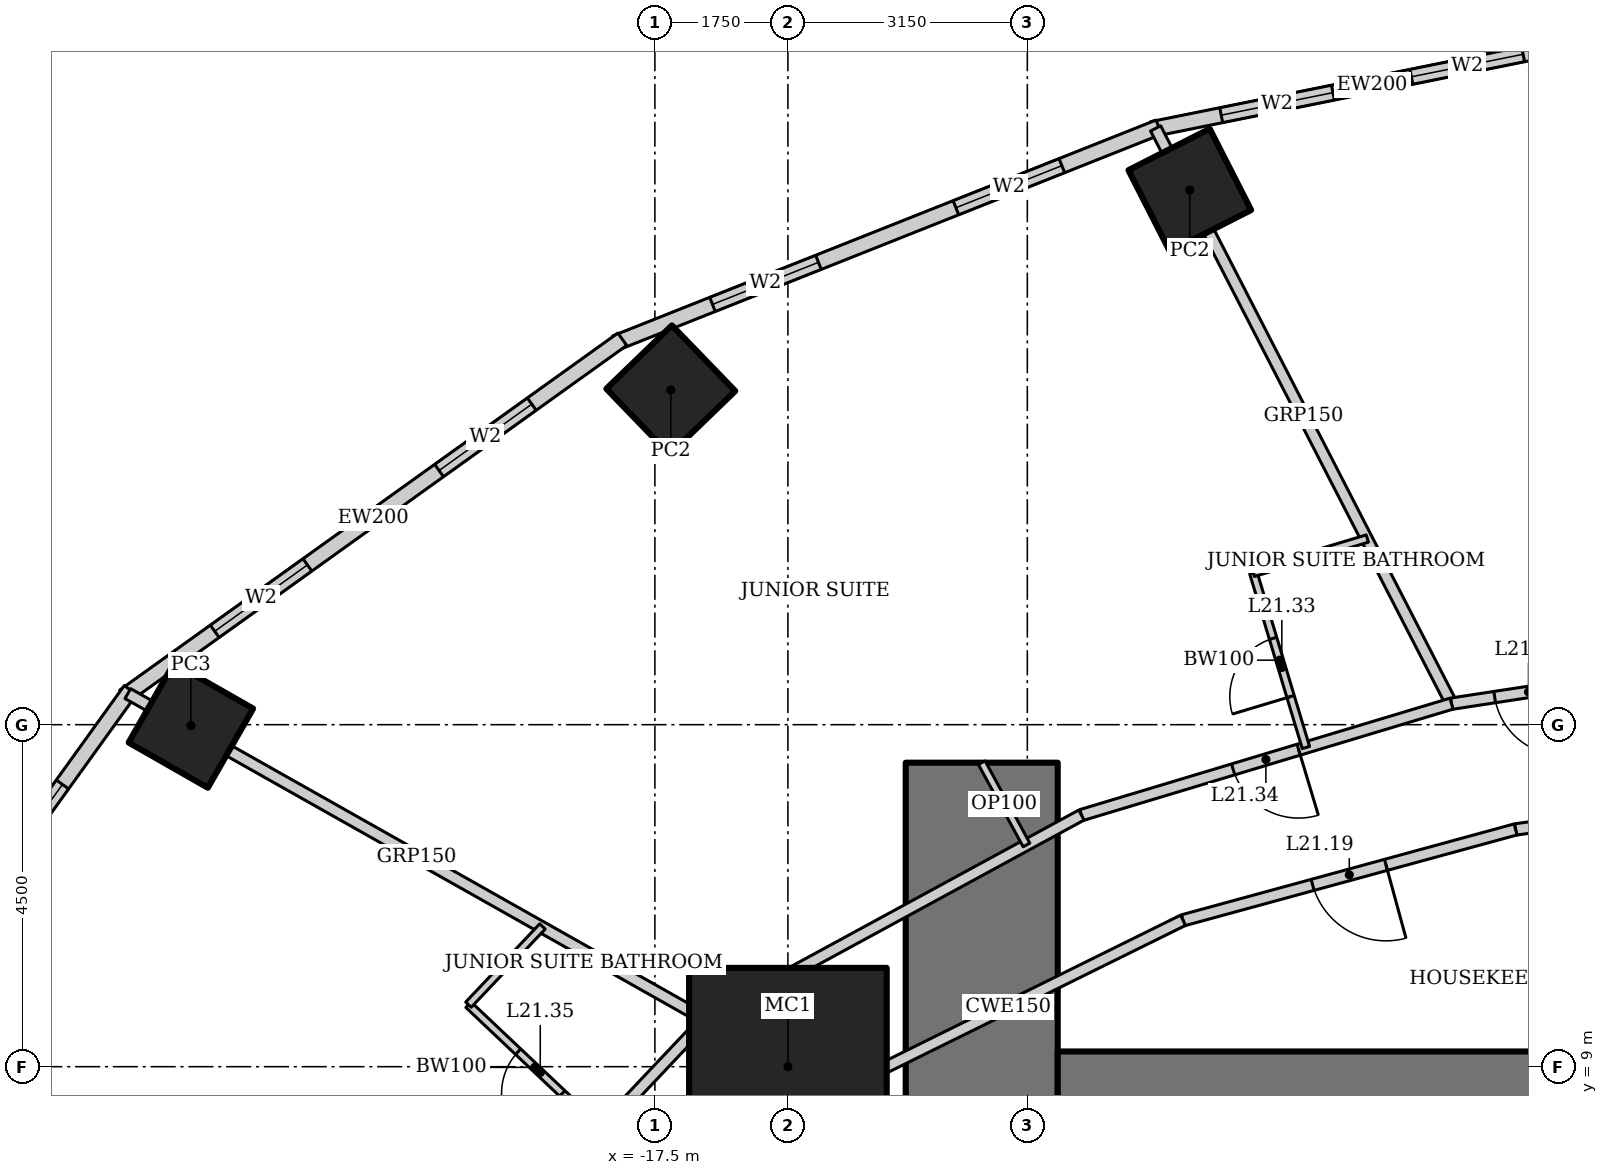
"""IFC4 building model, lengths in metres.
Left out: names, types, materials, properties, quantities, classifications, styles, units other than length and angle.
Written with IfcOpenShell. Run it as: python <this file> out.ifc"""

import sys

from ifc_helpers import new_model, si_unit, direction, frame, frame_2d, origin, origin_2d, place, context, subcontext, project, spatial, rectangle, hollow_rectangle, extrude, element, fill, save


model = new_model("IFC4")
c1 = context("Model", 3, precision=1e-05, world=origin(), true_north=direction((0.0, 1.0)))
c2 = subcontext(c1, "Body", "Model", "MODEL_VIEW")
j1 = project(units=[si_unit("LENGTHUNIT", "METRE"), si_unit("PLANEANGLEUNIT", "RADIAN")], contexts=[c1])
p1 = place(None, origin())
s1 = spatial("IfcSite", under=j1, at=p1, CompositionType="ELEMENT")
p2 = place(p1, origin())
s2 = spatial("IfcBuilding", under=s1, at=p2, CompositionType="ELEMENT")
p3 = place(p2, frame((0.0, 0.0, 91.0)))
s3 = spatial("IfcBuildingStorey", under=s2, at=p3, CompositionType="ELEMENT", Elevation=91.0)
p4 = place(p3, frame((-15.75, 9.0, 0.0), z_axis=(0.0, 0.0, 1.0), x_axis=(1.0, 0.0, 0.0)))
e1 = element("IfcColumn", 1, at=p4, inside=s3, PredefinedType="COLUMN", context=c2, shape_type="SweptSolid", body=[
    extrude(hollow_rectangle(XDim=2.6, YDim=2.6, WallThickness=0.13, at=origin_2d()), origin(), (0.0, 0.0, 1.0), 3.6),
])
for number, where, z_axis, x_axis in (
    (2, (-10.463, 20.534, 0.0), (0.0, 0.0, 1.0), (0.891, 0.454, 0.0)),
    (3, (-17.291, 17.905, 0.0), (0.0, 0.0, 1.0), (0.719, 0.695, 0.0)),
):
    element("IfcColumn", number, at=place(p3, frame(where, z_axis=z_axis, x_axis=x_axis)), inside=s3, PredefinedType="COLUMN", context=c2, shape_type="SweptSolid", body=[
        extrude(hollow_rectangle(XDim=1.2, YDim=1.2, WallThickness=0.1, at=origin_2d()), origin(), (0.0, 0.0, 1.0), 3.6),
    ])
p5 = place(p3, frame((-23.605, 13.489, 0.0), z_axis=(0.0, 0.0, 1.0), x_axis=(0.496139221777, 0.86824298017, 0.0)))
e4 = element("IfcColumn", 4, at=p5, inside=s3, PredefinedType="COLUMN", context=c2, shape_type="SweptSolid", body=[
    extrude(hollow_rectangle(XDim=1.2, YDim=1.2, WallThickness=0.12, at=origin_2d()), origin(), (0.0, 0.0, 1.0), 3.6),
])
p6 = place(p3, frame((-13.2, 13.0, 0.0), z_axis=(0.0, 0.0, 1.0), x_axis=(0.0, -1.0, 0.0)))
e5 = element("IfcWall", 5, at=p6, inside=s3, PredefinedType="SHEAR", context=c2, shape_type="SweptSolid", body=[
    extrude(rectangle(XDim=26.0, YDim=2.0, at=frame_2d((13.0, 0.0))), origin(), (0.0, 0.0, 1.0), 3.6),
])
p7 = place(p6, frame((12.1, 0.0, 0.0)))
e6 = element("IfcOpeningElement", 6, at=p7, cuts=e5, PredefinedType="OPENING", context=c2, shape_type="SweptSolid", body=[
    extrude(rectangle(XDim=1.8, YDim=2.1, at=frame_2d((0.9, 1.05))), frame((0.0, 1.01, 0.0), z_axis=(0.0, -1.0, 0.0), x_axis=(1.0, 0.0, 0.0)), (0.0, 0.0, 1.0), 2.02),
])
p8 = place(p3, frame((12.2, 8.0, 0.0), z_axis=(0.0, 0.0, 1.0), x_axis=(-1.0, 0.0, 0.0)))
e7 = element("IfcWall", 7, at=p8, inside=s3, PredefinedType="SHEAR", context=c2, shape_type="SweptSolid", body=[
    extrude(rectangle(XDim=24.4, YDim=2.4, at=frame_2d((12.2, 0.0))), origin(), (0.0, 0.0, 1.0), 3.6),
])
p9 = place(p3, frame((-5.17, 22.504, 0.0), z_axis=(0.0, 0.0, 1.0), x_axis=(-0.980251657452, -0.197754110105, 0.0)))
e8 = element("IfcWall", 8, at=p9, inside=s3, PredefinedType="SOLIDWALL", context=c2, shape_type="SweptSolid", body=[
    extrude(rectangle(XDim=5.904, YDim=0.2, at=frame_2d((2.952, 0.0))), origin(), (0.0, 0.0, 1.0), 3.45),
])
p10 = place(p9, frame((0.926, 0.0, 0.5)))
e9 = element("IfcOpeningElement", 9, at=p10, cuts=e8, PredefinedType="OPENING", context=c2, shape_type="SweptSolid", body=[
    extrude(rectangle(XDim=1.5, YDim=2.2, at=frame_2d((0.75, 1.1))), frame((0.0, 0.11, 0.0), z_axis=(0.0, -1.0, 0.0), x_axis=(1.0, 0.0, 0.0)), (0.0, 0.0, 1.0), 0.22),
])
p11 = place(p9, frame((3.478, 0.0, 0.5)))
e10 = element("IfcOpeningElement", 10, at=p11, cuts=e8, PredefinedType="OPENING", context=c2, shape_type="SweptSolid", body=[
    extrude(rectangle(XDim=1.5, YDim=2.2, at=frame_2d((0.75, 1.1))), frame((0.0, 0.11, 0.0), z_axis=(0.0, -1.0, 0.0), x_axis=(1.0, 0.0, 0.0)), (0.0, 0.0, 1.0), 0.22),
])
p12 = place(p3, frame((-10.869, 21.363, 0.0), z_axis=(0.0, 0.0, 1.0), x_axis=(-0.929358351251, -0.369178892895, 0.0)))
e11 = element("IfcWall", 11, at=p12, inside=s3, PredefinedType="SOLIDWALL", context=c2, shape_type="SweptSolid", body=[
    extrude(rectangle(XDim=7.692, YDim=0.2, at=frame_2d((3.846, 0.0))), origin(), (0.0, 0.0, 1.0), 3.45),
])
p13 = place(p12, frame((1.373, 0.0, 0.5)))
e12 = element("IfcOpeningElement", 12, at=p13, cuts=e11, PredefinedType="OPENING", context=c2, shape_type="SweptSolid", body=[
    extrude(rectangle(XDim=1.5, YDim=2.2, at=frame_2d((0.75, 1.1))), frame((0.0, 0.11, 0.0), z_axis=(0.0, -1.0, 0.0), x_axis=(1.0, 0.0, 0.0)), (0.0, 0.0, 1.0), 0.22),
])
p14 = place(p12, frame((4.819, 0.0, 0.5)))
e13 = element("IfcOpeningElement", 13, at=p14, cuts=e11, PredefinedType="OPENING", context=c2, shape_type="SweptSolid", body=[
    extrude(rectangle(XDim=1.5, YDim=2.2, at=frame_2d((0.75, 1.1))), frame((0.0, 0.11, 0.0), z_axis=(0.0, -1.0, 0.0), x_axis=(1.0, 0.0, 0.0)), (0.0, 0.0, 1.0), 0.22),
])
p15 = place(p3, frame((-17.929, 18.572, 0.0), z_axis=(0.0, 0.0, 1.0), x_axis=(-0.812791321576, -0.582554948112, 0.0)))
e14 = element("IfcWall", 14, at=p15, inside=s3, PredefinedType="SOLIDWALL", context=c2, shape_type="SweptSolid", body=[
    extrude(rectangle(XDim=8.063, YDim=0.2, at=frame_2d((4.032, 0.0))), origin(), (0.0, 0.0, 1.0), 3.45),
])
p16 = place(p15, frame((1.466, 0.0, 0.5)))
e15 = element("IfcOpeningElement", 15, at=p16, cuts=e14, PredefinedType="OPENING", context=c2, shape_type="SweptSolid", body=[
    extrude(rectangle(XDim=1.5, YDim=2.2, at=frame_2d((0.75, 1.1))), frame((0.0, 0.11, 0.0), z_axis=(0.0, -1.0, 0.0), x_axis=(1.0, 0.0, 0.0)), (0.0, 0.0, 1.0), 0.22),
])
p17 = place(p15, frame((5.097, 0.0, 0.5)))
e16 = element("IfcOpeningElement", 16, at=p17, cuts=e14, PredefinedType="OPENING", context=c2, shape_type="SweptSolid", body=[
    extrude(rectangle(XDim=1.5, YDim=2.2, at=frame_2d((0.75, 1.1))), frame((0.0, 0.11, 0.0), z_axis=(0.0, -1.0, 0.0), x_axis=(1.0, 0.0, 0.0)), (0.0, 0.0, 1.0), 0.22),
])
p18 = place(p3, frame((-24.4, 13.957, 0.0), z_axis=(0.0, 0.0, 1.0), x_axis=(-0.583937613703, -0.811798536155, 0.0)))
e17 = element("IfcWall", 17, at=p18, inside=s3, PredefinedType="SOLIDWALL", context=c2, shape_type="SweptSolid", body=[
    extrude(rectangle(XDim=8.323, YDim=0.2, at=frame_2d((4.162, 0.0))), origin(), (0.0, 0.0, 1.0), 3.45),
])
p19 = place(p18, frame((1.531, 0.0, 0.5)))
e18 = element("IfcOpeningElement", 18, at=p19, cuts=e17, PredefinedType="OPENING", context=c2, shape_type="SweptSolid", body=[
    extrude(rectangle(XDim=1.5, YDim=2.2, at=frame_2d((0.75, 1.1))), frame((0.0, 0.11, 0.0), z_axis=(0.0, -1.0, 0.0), x_axis=(1.0, 0.0, 0.0)), (0.0, 0.0, 1.0), 0.22),
])
p20 = place(p18, frame((5.292, 0.0, 0.5)))
e19 = element("IfcOpeningElement", 19, at=p20, cuts=e17, PredefinedType="OPENING", context=c2, shape_type="SweptSolid", body=[
    extrude(rectangle(XDim=1.5, YDim=2.2, at=frame_2d((0.75, 1.1))), frame((0.0, 0.11, 0.0), z_axis=(0.0, -1.0, 0.0), x_axis=(1.0, 0.0, 0.0)), (0.0, 0.0, 1.0), 0.22),
])
p21 = place(p3, frame((-10.912, 21.346, 0.0), z_axis=(0.0, 0.0, 1.0), x_axis=(0.457327273085, -0.889298468059, 0.0)))
e20 = element("IfcWall", 20, at=p21, inside=s3, PredefinedType="PARTITIONING", context=c2, shape_type="SweptSolid", body=[
    extrude(rectangle(XDim=8.511, YDim=0.15, at=frame_2d((4.256, 0.0))), origin(), (0.0, 0.0, 1.0), 2.528),
])
p22 = place(p3, frame((-24.435, 13.909, 0.0), z_axis=(0.0, 0.0, 1.0), x_axis=(0.87090601027, -0.491449612143, 0.0)))
e21 = element("IfcWall", 21, at=p22, inside=s3, PredefinedType="PARTITIONING", context=c2, shape_type="SweptSolid", body=[
    extrude(rectangle(XDim=8.726, YDim=0.15, at=frame_2d((4.363, 0.0))), origin(), (0.0, 0.0, 1.0), 2.693),
])
p23 = place(p3, frame((-3.311, 14.342, 0.0), z_axis=(0.0, 0.0, 1.0), x_axis=(-0.988564270062, -0.150800145746, 0.0)))
e22 = element("IfcWall", 22, at=p23, inside=s3, PredefinedType="PARTITIONING", context=c2, shape_type="SweptSolid", body=[
    extrude(rectangle(XDim=3.751, YDim=0.15, at=frame_2d((1.875, 0.0))), origin(), (0.0, 0.0, 1.0), 3.45),
])
p24 = place(p23, frame((2.276, 0.0, 0.0)))
e23 = element("IfcOpeningElement", 23, at=p24, cuts=e22, PredefinedType="OPENING", context=c2, shape_type="SweptSolid", body=[
    extrude(rectangle(XDim=0.9, YDim=2.1, at=frame_2d((0.45, 1.05))), frame((0.0, 0.085, 0.0), z_axis=(0.0, -1.0, 0.0), x_axis=(1.0, 0.0, 0.0)), (0.0, 0.0, 1.0), 0.17),
])
p25 = place(p3, frame((-7.019, 13.776, 0.0), z_axis=(0.0, 0.0, 1.0), x_axis=(-0.957564241242, -0.288219922793, 0.0)))
e24 = element("IfcWall", 24, at=p25, inside=s3, PredefinedType="PARTITIONING", context=c2, shape_type="SweptSolid", body=[
    extrude(rectangle(XDim=5.085, YDim=0.15, at=frame_2d((2.542, 0.0))), origin(), (0.0, 0.0, 1.0), 3.45),
])
p26 = place(p25, frame((2.1, 0.0, 0.0)))
e25 = element("IfcOpeningElement", 25, at=p26, cuts=e24, PredefinedType="OPENING", context=c2, shape_type="SweptSolid", body=[
    extrude(rectangle(XDim=0.9, YDim=2.1, at=frame_2d((0.45, 1.05))), frame((0.0, 0.085, 0.0), z_axis=(0.0, -1.0, 0.0), x_axis=(1.0, 0.0, 0.0)), (0.0, 0.0, 1.0), 0.17),
])
p27 = place(p3, frame((-11.888, 12.311, 0.0), z_axis=(0.0, 0.0, 1.0), x_axis=(-0.878450059298, -0.477834169267, 0.0)))
e26 = element("IfcWall", 26, at=p27, inside=s3, PredefinedType="PARTITIONING", context=c2, shape_type="SweptSolid", body=[
    extrude(rectangle(XDim=5.631, YDim=0.15, at=frame_2d((2.815, 0.0))), origin(), (0.0, 0.0, 1.0), 3.45),
])
p28 = place(p3, frame((-16.835, 9.62, 0.0), z_axis=(0.0, 0.0, 1.0), x_axis=(-0.687062608696, -0.726598218916, 0.0)))
e27 = element("IfcWall", 27, at=p28, inside=s3, PredefinedType="PARTITIONING", context=c2, shape_type="SweptSolid", body=[
    extrude(rectangle(XDim=6.039, YDim=0.15, at=frame_2d((3.02, 0.0))), origin(), (0.0, 0.0, 1.0), 3.45),
])
p29 = place(p3, frame((-2.903, 12.574, 0.0), z_axis=(0.0, 0.0, 1.0), x_axis=(-0.990563451353, -0.137054911782, 0.0)))
e28 = element("IfcWall", 28, at=p29, inside=s3, PredefinedType="PARTITIONING", context=c2, shape_type="SweptSolid", body=[
    extrude(rectangle(XDim=3.304, YDim=0.15, at=frame_2d((1.652, 0.0))), origin(), (0.0, 0.0, 1.0), 3.45),
])
p30 = place(p29, frame((0.1, 0.0, 0.0)))
e29 = element("IfcOpeningElement", 29, at=p30, cuts=e28, PredefinedType="OPENING", context=c2, shape_type="SweptSolid", body=[
    extrude(rectangle(XDim=0.9, YDim=2.1, at=frame_2d((0.45, 1.05))), frame((0.0, 0.085, 0.0), z_axis=(0.0, -1.0, 0.0), x_axis=(1.0, 0.0, 0.0)), (0.0, 0.0, 1.0), 0.17),
])
p31 = place(p3, frame((-6.176, 12.122, 0.0), z_axis=(0.0, 0.0, 1.0), x_axis=(-0.964644466646, -0.263554648923, 0.0)))
e30 = element("IfcWall", 30, at=p31, inside=s3, PredefinedType="PARTITIONING", context=c2, shape_type="SweptSolid", body=[
    extrude(rectangle(XDim=4.535, YDim=0.15, at=frame_2d((2.268, 0.0))), origin(), (0.0, 0.0, 1.0), 3.45),
])
p32 = place(p31, frame((1.768, 0.0, 0.0)))
e31 = element("IfcOpeningElement", 31, at=p32, cuts=e30, PredefinedType="OPENING", context=c2, shape_type="SweptSolid", body=[
    extrude(rectangle(XDim=1.0, YDim=2.1, at=frame_2d((0.5, 1.05))), frame((0.0, 0.085, 0.0), z_axis=(0.0, -1.0, 0.0), x_axis=(1.0, 0.0, 0.0)), (0.0, 0.0, 1.0), 0.17),
])
p33 = place(p3, frame((-10.551, 10.926, 0.0), z_axis=(0.0, 0.0, 1.0), x_axis=(-0.89656943448, -0.442903205177, 0.0)))
e32 = element("IfcWall", 32, at=p33, inside=s3, PredefinedType="PARTITIONING", context=c2, shape_type="SweptSolid", body=[
    extrude(rectangle(XDim=5.126, YDim=0.15, at=frame_2d((2.563, 0.0))), origin(), (0.0, 0.0, 1.0), 3.45),
])
p34 = place(p3, frame((-15.147, 8.656, 0.0), z_axis=(0.0, 0.0, 1.0), x_axis=(-0.720837261072, -0.693104352209, 0.0)))
e33 = element("IfcWall", 33, at=p34, inside=s3, PredefinedType="PARTITIONING", context=c2, shape_type="SweptSolid", body=[
    extrude(rectangle(XDim=5.59, YDim=0.15, at=frame_2d((2.795, 0.0))), origin(), (0.0, 0.0, 1.0), 3.45),
])
p35 = place(p34, frame((2.295, 0.0, 0.0)))
e34 = element("IfcOpeningElement", 34, at=p35, cuts=e33, PredefinedType="OPENING", context=c2, shape_type="SweptSolid", body=[
    extrude(rectangle(XDim=1.0, YDim=2.1, at=frame_2d((0.5, 1.05))), frame((0.0, 0.085, 0.0), z_axis=(0.0, -1.0, 0.0), x_axis=(1.0, 0.0, 0.0)), (0.0, 0.0, 1.0), 0.17),
])
p36 = place(p3, frame((-8.935, 13.2, 0.0), z_axis=(0.0, 0.0, 1.0), x_axis=(-0.288197066254, 0.957571120598, 0.0)))
e35 = element("IfcWall", 35, at=p36, inside=s3, PredefinedType="PARTITIONING", context=c2, shape_type="SweptSolid", body=[
    extrude(rectangle(XDim=2.4, YDim=0.1, at=frame_2d((1.2, 0.0))), origin(), (0.0, 0.0, 1.0), 3.45),
])
p37 = place(p36, frame((0.7, 0.0, 0.0)))
e36 = element("IfcOpeningElement", 36, at=p37, cuts=e35, PredefinedType="OPENING", context=c2, shape_type="SweptSolid", body=[
    extrude(rectangle(XDim=0.8, YDim=2.1, at=frame_2d((0.4, 1.05))), frame((0.0, 0.06, 0.0), z_axis=(0.0, -1.0, 0.0), x_axis=(1.0, 0.0, 0.0)), (0.0, 0.0, 1.0), 0.12),
])
p38 = place(p3, frame((-9.626, 15.498, 0.0), z_axis=(0.0, 0.0, 1.0), x_axis=(0.957551231109, 0.288263143328, 0.0)))
e37 = element("IfcWall", 37, at=p38, inside=s3, PredefinedType="PARTITIONING", context=c2, shape_type="SweptSolid", body=[
    extrude(rectangle(XDim=1.566, YDim=0.1, at=frame_2d((0.783, 0.0))), origin(), (0.0, 0.0, 1.0), 3.45),
])
p39 = place(p3, frame((-18.209, 8.167, 0.0), z_axis=(0.0, 0.0, 1.0), x_axis=(-0.726567238928, 0.687095369885, 0.0)))
e38 = element("IfcWall", 38, at=p39, inside=s3, PredefinedType="PARTITIONING", context=c2, shape_type="SweptSolid", body=[
    extrude(rectangle(XDim=2.4, YDim=0.1, at=frame_2d((1.2, 0.0))), origin(), (0.0, 0.0, 1.0), 3.45),
])
p40 = place(p39, frame((0.7, 0.0, 0.0)))
e39 = element("IfcOpeningElement", 39, at=p40, cuts=e38, PredefinedType="OPENING", context=c2, shape_type="SweptSolid", body=[
    extrude(rectangle(XDim=0.8, YDim=2.1, at=frame_2d((0.4, 1.05))), frame((0.0, 0.06, 0.0), z_axis=(0.0, -1.0, 0.0), x_axis=(1.0, 0.0, 0.0)), (0.0, 0.0, 1.0), 0.12),
])
p41 = place(p3, frame((-19.953, 9.816, 0.0), z_axis=(0.0, 0.0, 1.0), x_axis=(0.687017997787, 0.726640399866, 0.0)))
e40 = element("IfcWall", 40, at=p41, inside=s3, PredefinedType="PARTITIONING", context=c2, shape_type="SweptSolid", body=[
    extrude(rectangle(XDim=1.417, YDim=0.1, at=frame_2d((0.708, 0.0))), origin(), (0.0, 0.0, 1.0), 3.45),
])
p42 = place(p3, frame((-13.2, 13.0, 0.0), z_axis=(0.0, 0.0, 1.0), x_axis=(0.477852414256, -0.878440134665, 0.0)))
e41 = element("IfcWall", 41, at=p42, inside=s3, PredefinedType="PARTITIONING", context=c2, shape_type="SweptSolid", body=[
    extrude(rectangle(XDim=1.232, YDim=0.1, at=frame_2d((0.616, 0.0))), origin(), (0.0, 0.0, 1.0), 3.45),
])
p43 = place(p10, origin())
e42 = element("IfcWindow", 42, at=p43, inside=s3, PartitioningType="SINGLE_PANEL", PredefinedType="WINDOW", context=c2, shape_type="SweptSolid", body=[
    extrude(rectangle(XDim=1.5, YDim=2.2, at=frame_2d((0.75, 1.1))), frame((0.0, 0.03, 0.0), z_axis=(0.0, -1.0, 0.0), x_axis=(1.0, 0.0, 0.0)), (0.0, 0.0, 1.0), 0.06),
])
fill(e9, e42)
p44 = place(p11, origin())
e43 = element("IfcWindow", 43, at=p44, inside=s3, PartitioningType="SINGLE_PANEL", PredefinedType="WINDOW", context=c2, shape_type="SweptSolid", body=[
    extrude(rectangle(XDim=1.5, YDim=2.2, at=frame_2d((0.75, 1.1))), frame((0.0, 0.03, 0.0), z_axis=(0.0, -1.0, 0.0), x_axis=(1.0, 0.0, 0.0)), (0.0, 0.0, 1.0), 0.06),
])
fill(e10, e43)
p45 = place(p13, origin())
e44 = element("IfcWindow", 44, at=p45, inside=s3, PartitioningType="SINGLE_PANEL", PredefinedType="WINDOW", context=c2, shape_type="SweptSolid", body=[
    extrude(rectangle(XDim=1.5, YDim=2.2, at=frame_2d((0.75, 1.1))), frame((0.0, 0.03, 0.0), z_axis=(0.0, -1.0, 0.0), x_axis=(1.0, 0.0, 0.0)), (0.0, 0.0, 1.0), 0.06),
])
fill(e12, e44)
p46 = place(p14, origin())
e45 = element("IfcWindow", 45, at=p46, inside=s3, PartitioningType="SINGLE_PANEL", PredefinedType="WINDOW", context=c2, shape_type="SweptSolid", body=[
    extrude(rectangle(XDim=1.5, YDim=2.2, at=frame_2d((0.75, 1.1))), frame((0.0, 0.03, 0.0), z_axis=(0.0, -1.0, 0.0), x_axis=(1.0, 0.0, 0.0)), (0.0, 0.0, 1.0), 0.06),
])
fill(e13, e45)
p47 = place(p16, origin())
e46 = element("IfcWindow", 46, at=p47, inside=s3, PartitioningType="SINGLE_PANEL", PredefinedType="WINDOW", context=c2, shape_type="SweptSolid", body=[
    extrude(rectangle(XDim=1.5, YDim=2.2, at=frame_2d((0.75, 1.1))), frame((0.0, 0.03, 0.0), z_axis=(0.0, -1.0, 0.0), x_axis=(1.0, 0.0, 0.0)), (0.0, 0.0, 1.0), 0.06),
])
fill(e15, e46)
p48 = place(p17, origin())
e47 = element("IfcWindow", 47, at=p48, inside=s3, PartitioningType="SINGLE_PANEL", PredefinedType="WINDOW", context=c2, shape_type="SweptSolid", body=[
    extrude(rectangle(XDim=1.5, YDim=2.2, at=frame_2d((0.75, 1.1))), frame((0.0, 0.03, 0.0), z_axis=(0.0, -1.0, 0.0), x_axis=(1.0, 0.0, 0.0)), (0.0, 0.0, 1.0), 0.06),
])
fill(e16, e47)
p49 = place(p19, origin())
e48 = element("IfcWindow", 48, at=p49, inside=s3, PartitioningType="SINGLE_PANEL", PredefinedType="WINDOW", context=c2, shape_type="SweptSolid", body=[
    extrude(rectangle(XDim=1.5, YDim=2.2, at=frame_2d((0.75, 1.1))), frame((0.0, 0.03, 0.0), z_axis=(0.0, -1.0, 0.0), x_axis=(1.0, 0.0, 0.0)), (0.0, 0.0, 1.0), 0.06),
])
fill(e18, e48)
p50 = place(p32, origin())
e49 = element("IfcDoor", 49, at=p50, inside=s3, OperationType="SINGLE_SWING_LEFT", PredefinedType="DOOR", context=c2, shape_type="SweptSolid", body=[
    extrude(rectangle(XDim=1.0, YDim=2.1, at=frame_2d((0.5, 1.05))), frame((0.0, 0.025, 0.0), z_axis=(0.0, -1.0, 0.0), x_axis=(1.0, 0.0, 0.0)), (0.0, 0.0, 1.0), 0.05),
])
fill(e31, e49)
p51 = place(p24, origin())
e50 = element("IfcDoor", 50, at=p51, inside=s3, OperationType="SINGLE_SWING_LEFT", PredefinedType="DOOR", context=c2, shape_type="SweptSolid", body=[
    extrude(rectangle(XDim=0.9, YDim=2.1, at=frame_2d((0.45, 1.05))), frame((0.0, 0.025, 0.0), z_axis=(0.0, -1.0, 0.0), x_axis=(1.0, 0.0, 0.0)), (0.0, 0.0, 1.0), 0.05),
])
fill(e23, e50)
p52 = place(p37, origin())
e51 = element("IfcDoor", 51, at=p52, inside=s3, OperationType="SINGLE_SWING_LEFT", PredefinedType="DOOR", context=c2, shape_type="SweptSolid", body=[
    extrude(rectangle(XDim=0.8, YDim=2.1, at=frame_2d((0.4, 1.05))), frame((0.0, 0.025, 0.0), z_axis=(0.0, -1.0, 0.0), x_axis=(1.0, 0.0, 0.0)), (0.0, 0.0, 1.0), 0.05),
])
fill(e36, e51)
p53 = place(p26, origin())
e52 = element("IfcDoor", 52, at=p53, inside=s3, OperationType="SINGLE_SWING_LEFT", PredefinedType="DOOR", context=c2, shape_type="SweptSolid", body=[
    extrude(rectangle(XDim=0.9, YDim=2.1, at=frame_2d((0.45, 1.05))), frame((0.0, 0.025, 0.0), z_axis=(0.0, -1.0, 0.0), x_axis=(1.0, 0.0, 0.0)), (0.0, 0.0, 1.0), 0.05),
])
fill(e25, e52)
p54 = place(p40, origin())
e53 = element("IfcDoor", 53, at=p54, inside=s3, OperationType="SINGLE_SWING_LEFT", PredefinedType="DOOR", context=c2, shape_type="SweptSolid", body=[
    extrude(rectangle(XDim=0.8, YDim=2.1, at=frame_2d((0.4, 1.05))), frame((0.0, 0.025, 0.0), z_axis=(0.0, -1.0, 0.0), x_axis=(1.0, 0.0, 0.0)), (0.0, 0.0, 1.0), 0.05),
])
fill(e39, e53)
save(model, sys.argv[1])
